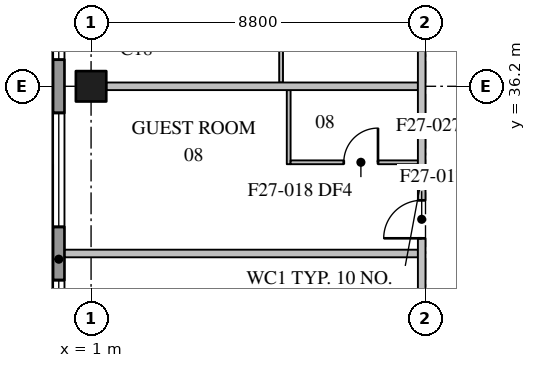
"""IFC4 building model, lengths in metres.
Left out: names, types, materials, properties, quantities, classifications, styles, units other than length and angle.
Written with IfcOpenShell. Run it as: python <this file> out.ifc"""

import sys

from ifc_helpers import new_model, si_unit, direction, frame, frame_2d, origin, origin_2d, place, context, subcontext, project, spatial, rectangle, extrude, element, fill, save


model = new_model("IFC4")
c1 = context("Model", 3, precision=1e-05, world=origin(), true_north=direction((0.0, 1.0)))
c2 = subcontext(c1, "Body", "Model", "MODEL_VIEW")
j1 = project(units=[si_unit("LENGTHUNIT", "METRE"), si_unit("PLANEANGLEUNIT", "RADIAN")], contexts=[c1])
p1 = place(None, origin())
s1 = spatial("IfcSite", under=j1, at=p1, CompositionType="ELEMENT")
p2 = place(p1, origin())
s2 = spatial("IfcBuilding", under=s1, at=p2, CompositionType="ELEMENT")
p3 = place(p2, frame((0.0, 0.0, 226.5)))
s3 = spatial("IfcBuildingStorey", under=s2, at=p3, CompositionType="ELEMENT", Elevation=226.5)
p4 = place(p3, frame((1.0, 36.2, 0.0), z_axis=(0.0, 0.0, 1.0), x_axis=(1.0, 0.0, 0.0)))
e1 = element("IfcColumn", 1, at=p4, inside=s3, PredefinedType="COLUMN", context=c2, shape_type="SweptSolid", body=[
    extrude(rectangle(XDim=0.8, YDim=0.8, at=origin_2d()), origin(), (0.0, 0.0, 1.0), 3.7),
])
p5 = place(p3, frame((0.15, 61.1, 0.0), z_axis=(0.0, 0.0, 1.0), x_axis=(0.0, -1.0, 0.0)))
e2 = element("IfcWall", 2, at=p5, inside=s3, PredefinedType="STANDARD", context=c2, shape_type="SweptSolid", body=[
    extrude(rectangle(XDim=58.9, YDim=0.3, at=frame_2d((29.45, 0.0))), origin(), (0.0, 0.0, 1.0), 3.4),
])
p6 = place(p5, frame((3.6, 0.0, 0.75)))
e3 = element("IfcOpeningElement", 3, at=p6, cuts=e2, PredefinedType="OPENING", context=c2, shape_type="SweptSolid", body=[
    extrude(rectangle(XDim=3.0, YDim=2.3, at=frame_2d((1.5, 1.15))), frame((0.0, 0.16, 0.0), z_axis=(0.0, -1.0, 0.0), x_axis=(1.0, 0.0, 0.0)), (0.0, 0.0, 1.0), 0.32),
])
p7 = place(p5, frame((8.0, 0.0, 0.75)))
e4 = element("IfcOpeningElement", 4, at=p7, cuts=e2, PredefinedType="OPENING", context=c2, shape_type="SweptSolid", body=[
    extrude(rectangle(XDim=3.0, YDim=2.3, at=frame_2d((1.5, 1.15))), frame((0.0, 0.16, 0.0), z_axis=(0.0, -1.0, 0.0), x_axis=(1.0, 0.0, 0.0)), (0.0, 0.0, 1.0), 0.32),
])
p8 = place(p5, frame((12.4, 0.0, 0.75)))
e5 = element("IfcOpeningElement", 5, at=p8, cuts=e2, PredefinedType="OPENING", context=c2, shape_type="SweptSolid", body=[
    extrude(rectangle(XDim=3.0, YDim=2.3, at=frame_2d((1.5, 1.15))), frame((0.0, 0.16, 0.0), z_axis=(0.0, -1.0, 0.0), x_axis=(1.0, 0.0, 0.0)), (0.0, 0.0, 1.0), 0.32),
])
p9 = place(p5, frame((16.8, 0.0, 0.75)))
e6 = element("IfcOpeningElement", 6, at=p9, cuts=e2, PredefinedType="OPENING", context=c2, shape_type="SweptSolid", body=[
    extrude(rectangle(XDim=3.0, YDim=2.3, at=frame_2d((1.5, 1.15))), frame((0.0, 0.16, 0.0), z_axis=(0.0, -1.0, 0.0), x_axis=(1.0, 0.0, 0.0)), (0.0, 0.0, 1.0), 0.32),
])
p10 = place(p5, frame((21.2, 0.0, 0.75)))
e7 = element("IfcOpeningElement", 7, at=p10, cuts=e2, PredefinedType="OPENING", context=c2, shape_type="SweptSolid", body=[
    extrude(rectangle(XDim=3.0, YDim=2.3, at=frame_2d((1.5, 1.15))), frame((0.0, 0.16, 0.0), z_axis=(0.0, -1.0, 0.0), x_axis=(1.0, 0.0, 0.0)), (0.0, 0.0, 1.0), 0.32),
])
p11 = place(p5, frame((25.6, 0.0, 0.75)))
e8 = element("IfcOpeningElement", 8, at=p11, cuts=e2, PredefinedType="OPENING", context=c2, shape_type="SweptSolid", body=[
    extrude(rectangle(XDim=3.0, YDim=2.3, at=frame_2d((1.5, 1.15))), frame((0.0, 0.16, 0.0), z_axis=(0.0, -1.0, 0.0), x_axis=(1.0, 0.0, 0.0)), (0.0, 0.0, 1.0), 0.32),
])
p12 = place(p5, frame((30.0, 0.0, 0.75)))
e9 = element("IfcOpeningElement", 9, at=p12, cuts=e2, PredefinedType="OPENING", context=c2, shape_type="SweptSolid", body=[
    extrude(rectangle(XDim=3.0, YDim=2.3, at=frame_2d((1.5, 1.15))), frame((0.0, 0.16, 0.0), z_axis=(0.0, -1.0, 0.0), x_axis=(1.0, 0.0, 0.0)), (0.0, 0.0, 1.0), 0.32),
])
p13 = place(p5, frame((34.4, 0.0, 0.75)))
e10 = element("IfcOpeningElement", 10, at=p13, cuts=e2, PredefinedType="OPENING", context=c2, shape_type="SweptSolid", body=[
    extrude(rectangle(XDim=3.0, YDim=2.3, at=frame_2d((1.5, 1.15))), frame((0.0, 0.16, 0.0), z_axis=(0.0, -1.0, 0.0), x_axis=(1.0, 0.0, 0.0)), (0.0, 0.0, 1.0), 0.32),
])
p14 = place(p5, frame((38.8, 0.0, 0.75)))
e11 = element("IfcOpeningElement", 11, at=p14, cuts=e2, PredefinedType="OPENING", context=c2, shape_type="SweptSolid", body=[
    extrude(rectangle(XDim=3.0, YDim=2.3, at=frame_2d((1.5, 1.15))), frame((0.0, 0.16, 0.0), z_axis=(0.0, -1.0, 0.0), x_axis=(1.0, 0.0, 0.0)), (0.0, 0.0, 1.0), 0.32),
])
p15 = place(p5, frame((43.2, 0.0, 0.75)))
e12 = element("IfcOpeningElement", 12, at=p15, cuts=e2, PredefinedType="OPENING", context=c2, shape_type="SweptSolid", body=[
    extrude(rectangle(XDim=3.0, YDim=2.3, at=frame_2d((1.5, 1.15))), frame((0.0, 0.16, 0.0), z_axis=(0.0, -1.0, 0.0), x_axis=(1.0, 0.0, 0.0)), (0.0, 0.0, 1.0), 0.32),
])
p16 = place(p5, frame((47.6, 0.0, 0.75)))
e13 = element("IfcOpeningElement", 13, at=p16, cuts=e2, PredefinedType="OPENING", context=c2, shape_type="SweptSolid", body=[
    extrude(rectangle(XDim=3.0, YDim=2.3, at=frame_2d((1.5, 1.15))), frame((0.0, 0.16, 0.0), z_axis=(0.0, -1.0, 0.0), x_axis=(1.0, 0.0, 0.0)), (0.0, 0.0, 1.0), 0.32),
])
p17 = place(p5, frame((52.0, 0.0, 0.75)))
e14 = element("IfcOpeningElement", 14, at=p17, cuts=e2, PredefinedType="OPENING", context=c2, shape_type="SweptSolid", body=[
    extrude(rectangle(XDim=3.0, YDim=2.3, at=frame_2d((1.5, 1.15))), frame((0.0, 0.16, 0.0), z_axis=(0.0, -1.0, 0.0), x_axis=(1.0, 0.0, 0.0)), (0.0, 0.0, 1.0), 0.32),
])
p18 = place(p3, frame((9.7, 9.8, 0.0), z_axis=(0.0, 0.0, 1.0), x_axis=(0.0, 1.0, 0.0)))
e15 = element("IfcWall", 15, at=p18, inside=s3, PredefinedType="PARTITIONING", context=c2, shape_type="SweptSolid", body=[
    extrude(rectangle(XDim=48.0, YDim=0.2, at=frame_2d((24.0, 0.0))), origin(), (0.0, 0.0, 1.0), 3.4),
])
p19 = place(p18, frame((2.55, 0.0, 0.0)))
e16 = element("IfcOpeningElement", 16, at=p19, cuts=e15, PredefinedType="OPENING", context=c2, shape_type="SweptSolid", body=[
    extrude(rectangle(XDim=1.1, YDim=2.1, at=frame_2d((0.55, 1.05))), frame((0.0, 0.11, 0.0), z_axis=(0.0, -1.0, 0.0), x_axis=(1.0, 0.0, 0.0)), (0.0, 0.0, 1.0), 0.22),
])
p20 = place(p18, frame((4.8, 0.0, 0.0)))
e17 = element("IfcOpeningElement", 17, at=p20, cuts=e15, PredefinedType="OPENING", context=c2, shape_type="SweptSolid", body=[
    extrude(rectangle(XDim=1.0, YDim=2.1, at=frame_2d((0.5, 1.05))), frame((0.0, 0.11, 0.0), z_axis=(0.0, -1.0, 0.0), x_axis=(1.0, 0.0, 0.0)), (0.0, 0.0, 1.0), 0.22),
])
p21 = place(p18, frame((17.2, 0.0, 0.0)))
e18 = element("IfcOpeningElement", 18, at=p21, cuts=e15, PredefinedType="OPENING", context=c2, shape_type="SweptSolid", body=[
    extrude(rectangle(XDim=1.1, YDim=2.1, at=frame_2d((0.55, 1.05))), frame((0.0, 0.11, 0.0), z_axis=(0.0, -1.0, 0.0), x_axis=(1.0, 0.0, 0.0)), (0.0, 0.0, 1.0), 0.22),
])
p22 = place(p18, frame((22.4, 0.0, 0.0)))
e19 = element("IfcOpeningElement", 19, at=p22, cuts=e15, PredefinedType="OPENING", context=c2, shape_type="SweptSolid", body=[
    extrude(rectangle(XDim=1.0, YDim=2.1, at=frame_2d((0.5, 1.05))), frame((0.0, 0.11, 0.0), z_axis=(0.0, -1.0, 0.0), x_axis=(1.0, 0.0, 0.0)), (0.0, 0.0, 1.0), 0.22),
])
p23 = place(p18, frame((32.6, 0.0, 0.0)))
e20 = element("IfcOpeningElement", 20, at=p23, cuts=e15, PredefinedType="OPENING", context=c2, shape_type="SweptSolid", body=[
    extrude(rectangle(XDim=1.1, YDim=2.1, at=frame_2d((0.55, 1.05))), frame((0.0, 0.11, 0.0), z_axis=(0.0, -1.0, 0.0), x_axis=(1.0, 0.0, 0.0)), (0.0, 0.0, 1.0), 0.22),
])
p24 = place(p18, frame((35.6, 0.0, 0.0)))
e21 = element("IfcOpeningElement", 21, at=p24, cuts=e15, PredefinedType="OPENING", context=c2, shape_type="SweptSolid", body=[
    extrude(rectangle(XDim=1.0, YDim=2.1, at=frame_2d((0.5, 1.05))), frame((0.0, 0.11, 0.0), z_axis=(0.0, -1.0, 0.0), x_axis=(1.0, 0.0, 0.0)), (0.0, 0.0, 1.0), 0.22),
])
p25 = place(p18, frame((45.6, 0.0, 0.0)))
e22 = element("IfcOpeningElement", 22, at=p25, cuts=e15, PredefinedType="OPENING", context=c2, shape_type="SweptSolid", body=[
    extrude(rectangle(XDim=1.1, YDim=2.1, at=frame_2d((0.55, 1.05))), frame((0.0, 0.11, 0.0), z_axis=(0.0, -1.0, 0.0), x_axis=(1.0, 0.0, 0.0)), (0.0, 0.0, 1.0), 0.22),
])
p26 = place(p3, frame((0.31, 31.8, 0.0), z_axis=(0.0, 0.0, 1.0), x_axis=(1.0, 0.0, 0.0)))
e23 = element("IfcWall", 23, at=p26, inside=s3, PredefinedType="PARTITIONING", context=c2, shape_type="SweptSolid", body=[
    extrude(rectangle(XDim=9.29, YDim=0.2, at=frame_2d((4.645, 0.0))), origin(), (0.0, 0.0, 1.0), 3.4),
])
p27 = place(p3, frame((1.4, 36.2, 0.0), z_axis=(0.0, 0.0, 1.0), x_axis=(1.0, 0.0, 0.0)))
e24 = element("IfcWall", 24, at=p27, inside=s3, PredefinedType="PARTITIONING", context=c2, shape_type="SweptSolid", body=[
    extrude(rectangle(XDim=8.2, YDim=0.2, at=frame_2d((4.1, 0.0))), origin(), (0.0, 0.0, 1.0), 3.4),
])
p28 = place(p3, frame((6.2, 34.15, 0.0), z_axis=(0.0, 0.0, 1.0), x_axis=(0.0, 1.0, 0.0)))
e25 = element("IfcWall", 25, at=p28, inside=s3, PredefinedType="PARTITIONING", context=c2, shape_type="SweptSolid", body=[
    extrude(rectangle(XDim=1.95, YDim=0.1, at=frame_2d((0.975, 0.0))), origin(), (0.0, 0.0, 1.0), 3.4),
])
p29 = place(p3, frame((6.0, 36.3, 0.0), z_axis=(0.0, 0.0, 1.0), x_axis=(0.0, 1.0, 0.0)))
e26 = element("IfcWall", 26, at=p29, inside=s3, PredefinedType="PARTITIONING", context=c2, shape_type="SweptSolid", body=[
    extrude(rectangle(XDim=3.25, YDim=0.1, at=frame_2d((1.625, 0.0))), origin(), (0.0, 0.0, 1.0), 3.4),
])
p30 = place(p3, frame((6.25, 34.2, 0.0), z_axis=(0.0, 0.0, 1.0), x_axis=(1.0, 0.0, 0.0)))
e27 = element("IfcWall", 27, at=p30, inside=s3, PredefinedType="PARTITIONING", context=c2, shape_type="SweptSolid", body=[
    extrude(rectangle(XDim=3.35, YDim=0.1, at=frame_2d((1.675, 0.0))), origin(), (0.0, 0.0, 1.0), 3.4),
])
p31 = place(p30, frame((1.4, 0.0, 0.0)))
e28 = element("IfcOpeningElement", 28, at=p31, cuts=e27, PredefinedType="OPENING", context=c2, shape_type="SweptSolid", body=[
    extrude(rectangle(XDim=0.9, YDim=2.1, at=frame_2d((0.45, 1.05))), frame((0.0, 0.06, 0.0), z_axis=(0.0, -1.0, 0.0), x_axis=(1.0, 0.0, 0.0)), (0.0, 0.0, 1.0), 0.12),
])
p32 = place(p10, origin())
e29 = element("IfcWindow", 29, at=p32, inside=s3, PartitioningType="SINGLE_PANEL", PredefinedType="WINDOW", context=c2, shape_type="SweptSolid", body=[
    extrude(rectangle(XDim=3.0, YDim=2.3, at=frame_2d((1.5, 1.15))), frame((0.0, 0.03, 0.0), z_axis=(0.0, -1.0, 0.0), x_axis=(1.0, 0.0, 0.0)), (0.0, 0.0, 1.0), 0.06),
])
fill(e7, e29)
p33 = place(p11, origin())
e30 = element("IfcWindow", 30, at=p33, inside=s3, PartitioningType="SINGLE_PANEL", PredefinedType="WINDOW", context=c2, shape_type="SweptSolid", body=[
    extrude(rectangle(XDim=3.0, YDim=2.3, at=frame_2d((1.5, 1.15))), frame((0.0, 0.03, 0.0), z_axis=(0.0, -1.0, 0.0), x_axis=(1.0, 0.0, 0.0)), (0.0, 0.0, 1.0), 0.06),
])
fill(e8, e30)
p34 = place(p12, origin())
e31 = element("IfcWindow", 31, at=p34, inside=s3, PartitioningType="SINGLE_PANEL", PredefinedType="WINDOW", context=c2, shape_type="SweptSolid", body=[
    extrude(rectangle(XDim=3.0, YDim=2.3, at=frame_2d((1.5, 1.15))), frame((0.0, 0.03, 0.0), z_axis=(0.0, -1.0, 0.0), x_axis=(1.0, 0.0, 0.0)), (0.0, 0.0, 1.0), 0.06),
])
fill(e9, e31)
p35 = place(p22, origin())
e32 = element("IfcDoor", 32, at=p35, inside=s3, OperationType="SINGLE_SWING_LEFT", PredefinedType="DOOR", context=c2, shape_type="SweptSolid", body=[
    extrude(rectangle(XDim=1.0, YDim=2.1, at=frame_2d((0.5, 1.05))), frame((0.0, 0.025, 0.0), z_axis=(0.0, -1.0, 0.0), x_axis=(1.0, 0.0, 0.0)), (0.0, 0.0, 1.0), 0.05),
])
fill(e19, e32)
p36 = place(p31, origin())
e33 = element("IfcDoor", 33, at=p36, inside=s3, OperationType="SINGLE_SWING_RIGHT", PredefinedType="DOOR", context=c2, shape_type="SweptSolid", body=[
    extrude(rectangle(XDim=0.9, YDim=2.1, at=frame_2d((0.45, 1.05))), frame((0.0, 0.025, 0.0), z_axis=(0.0, -1.0, 0.0), x_axis=(1.0, 0.0, 0.0)), (0.0, 0.0, 1.0), 0.05),
])
fill(e28, e33)
save(model, sys.argv[1])
